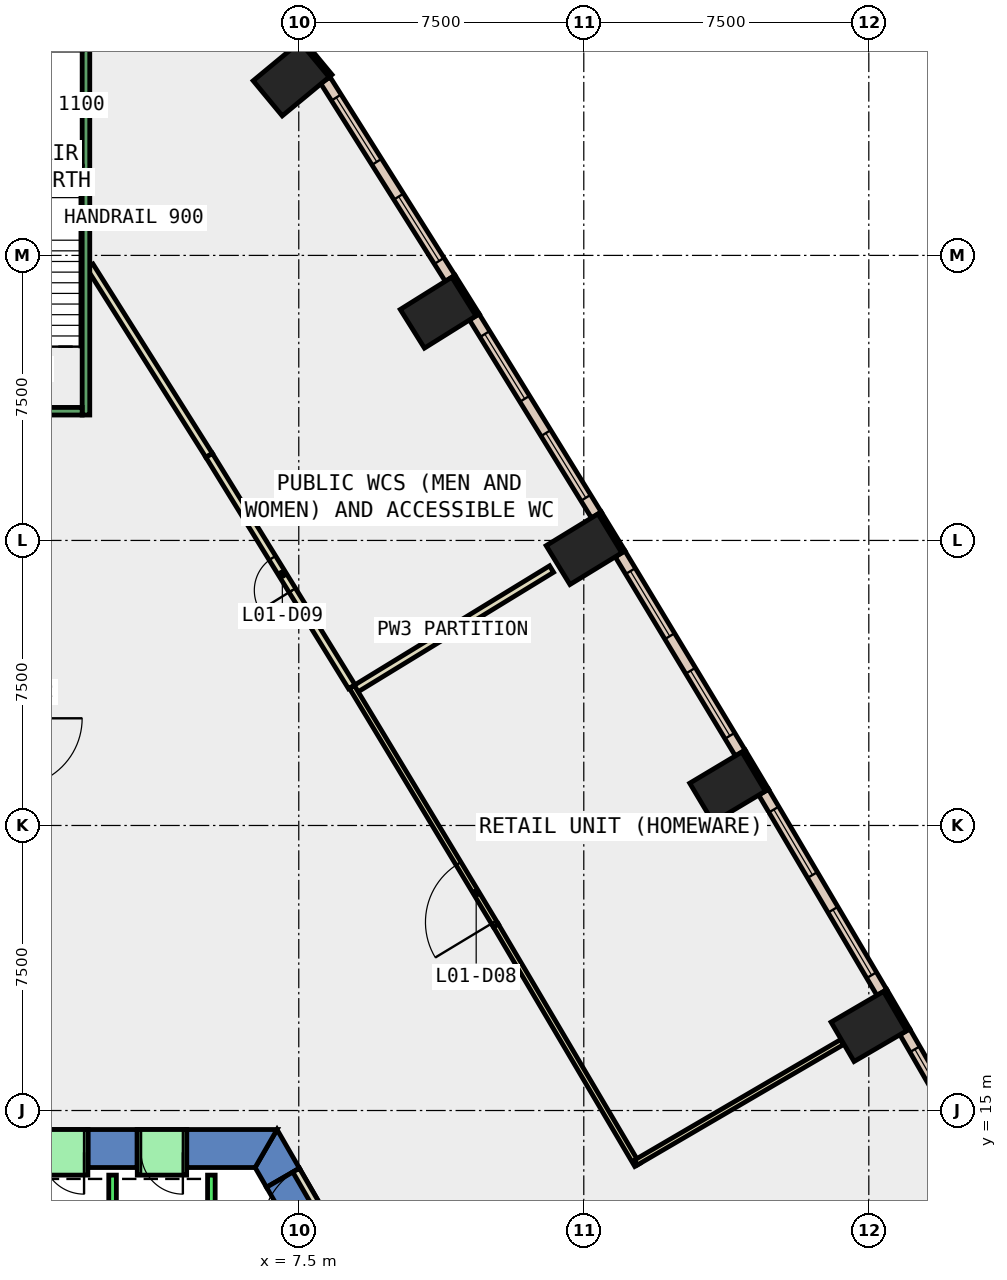
"""IFC4 building model, lengths in metres.
Left out: names, types, materials, properties, quantities, classifications, styles, units other than length and angle.
Written with IfcOpenShell. Run it as: python <this file> out.ifc"""

import sys

from ifc_helpers import new_model, si_unit, direction, frame, frame_2d, origin, origin_2d, place, context, subcontext, project, spatial, polyline, rectangle, outline, extrude, element, fill, save


model = new_model("IFC4")
c1 = context("Model", 3, precision=1e-05, world=origin(), true_north=direction((0.0, 1.0)))
c2 = subcontext(c1, "Body", "Model", "MODEL_VIEW")
j1 = project(units=[si_unit("LENGTHUNIT", "METRE"), si_unit("PLANEANGLEUNIT", "RADIAN")], contexts=[c1])
p1 = place(None, origin())
s1 = spatial("IfcSite", under=j1, at=p1, CompositionType="ELEMENT")
p2 = place(p1, origin())
s2 = spatial("IfcBuilding", under=s1, at=p2, CompositionType="ELEMENT")
p3 = place(p2, frame((0.0, 0.0, 9.0)))
s3 = spatial("IfcBuildingStorey", under=s2, at=p3, CompositionType="ELEMENT", Elevation=9.0)
for number, where, z_axis, x_axis in (
    (1, (22.5, 17.211, -0.45), (0.0, 0.0, 1.0), (-0.504, 0.864, 0.0)),
    (2, (18.782, 23.508, -0.45), (0.0, 0.0, 1.0), (-0.513, 0.858, 0.0)),
    (3, (15.005, 29.769, -0.45), (0.0, 0.0, 1.0), (-0.522, 0.853, 0.0)),
    (4, (11.167, 35.993, -0.45), (0.0, 0.0, 1.0), (-0.53, 0.848, 0.0)),
    (5, (7.299, 42.144, -0.45), (0.0, 0.0, 1.0), (-0.638, 0.77, 0.0)),
):
    element("IfcColumn", number, at=place(p3, frame(where, z_axis=z_axis, x_axis=x_axis)), inside=s3, PredefinedType="COLUMN", context=c2, shape_type="SweptSolid", body=[
        extrude(rectangle(XDim=1.2, YDim=1.6, at=origin_2d()), origin(), (0.0, 0.0, 1.0), 6.0),
    ])
p4 = place(p3, frame((0.0, 0.0, -0.45)))
e6 = element("IfcWall", 6, at=p4, inside=s3, PredefinedType="SHEAR", context=c2, shape_type="SweptSolid", body=[
    extrude(outline(polyline([(6.651, 12.98), (7.517, 13.48), (6.928, 14.5), (6.351, 13.5), (6.651, 12.98)])), origin(), (0.0, 0.0, 1.0), 6.0),
])
p5 = place(p3, frame((0.0, 0.0, 3.6)))
e7 = element("IfcWall", 7, at=p5, inside=s3, PredefinedType="SHEAR", context=c2, shape_type="SweptSolid", body=[
    extrude(outline(polyline([(7.517, 13.48), (6.651, 12.98), (7.651, 11.248), (8.517, 11.748), (7.517, 13.48)])), origin(), (0.0, 0.0, 1.0), 1.95),
])
p6 = place(p3, frame((0.0, 0.0, -0.45)))
e8 = element("IfcWall", 8, at=p6, inside=s3, PredefinedType="SHEAR", context=c2, shape_type="SweptSolid", body=[
    extrude(outline(polyline([(4.55, 14.5), (4.55, 13.5), (6.351, 13.5), (6.928, 14.5), (4.55, 14.5)])), origin(), (0.0, 0.0, 1.0), 6.0),
])
p7 = place(p3, frame((0.0, 0.0, -0.45)))
e9 = element("IfcWall", 9, at=p7, inside=s3, PredefinedType="SHEAR", context=c2, shape_type="SweptSolid", body=[
    extrude(outline(polyline([(1.95, 14.5), (1.95, 13.5), (3.25, 13.5), (3.25, 14.5), (1.95, 14.5)])), origin(), (0.0, 0.0, 1.0), 6.0),
])
p8 = place(p3, frame((0.0, 0.0, 3.6)))
e10 = element("IfcWall", 10, at=p8, inside=s3, PredefinedType="SHEAR", context=c2, shape_type="SweptSolid", body=[
    extrude(outline(polyline([(3.25, 14.5), (3.25, 13.5), (4.55, 13.5), (4.55, 14.5), (3.25, 14.5)])), origin(), (0.0, 0.0, 1.0), 1.95),
])
p9 = place(p3, frame((0.0, 0.0, 3.6)))
e11 = element("IfcWall", 11, at=p9, inside=s3, PredefinedType="SHEAR", context=c2, shape_type="SweptSolid", body=[
    extrude(outline(polyline([(0.65, 14.5), (0.65, 13.5), (1.95, 13.5), (1.95, 14.5), (0.65, 14.5)])), origin(), (0.0, 0.0, 1.0), 1.95),
])
p10 = place(p3, frame((23.536, 17.122, 0.0), z_axis=(0.0, 0.0, 1.0), x_axis=(-0.504313844903, 0.863520437418, 0.0)))
e12 = element("IfcWall", 12, at=p10, inside=s3, PredefinedType="STANDARD", context=c2, shape_type="SweptSolid", body=[
    extrude(rectangle(XDim=1.2, YDim=0.1, at=frame_2d((0.6, 0.0))), origin(), (0.0, 0.0, 1.0), 5.55),
])
p11 = place(p3, frame((19.82, 23.429, 0.0), z_axis=(0.0, 0.0, 1.0), x_axis=(-0.513238760752, 0.858245870635, 0.0)))
e13 = element("IfcWall", 13, at=p11, inside=s3, PredefinedType="STANDARD", context=c2, shape_type="SweptSolid", body=[
    extrude(rectangle(XDim=1.2, YDim=0.1, at=frame_2d((0.6, 0.0))), origin(), (0.0, 0.0, 1.0), 5.55),
])
p12 = place(p3, frame((16.043, 29.7, 0.0), z_axis=(0.0, 0.0, 1.0), x_axis=(-0.521507599072, 0.853246637327, 0.0)))
e14 = element("IfcWall", 14, at=p12, inside=s3, PredefinedType="STANDARD", context=c2, shape_type="SweptSolid", body=[
    extrude(rectangle(XDim=1.2, YDim=0.1, at=frame_2d((0.6, 0.0))), origin(), (0.0, 0.0, 1.0), 5.55),
])
for number, where, z_axis, x_axis in (
    (15, (12.206, 35.935, 0.0), (0.0, 0.0, 1.0), (-0.53, 0.848, 0.0)),
    (16, (8.336, 42.224, 0.0), (0.0, 0.0, 1.0), (-0.638, 0.77, 0.0)),
):
    element("IfcWall", number, at=place(p3, frame(where, z_axis=z_axis, x_axis=x_axis)), inside=s3, PredefinedType="STANDARD", context=c2, shape_type="SweptSolid", body=[
        extrude(rectangle(XDim=1.199, YDim=0.1, at=frame_2d((0.6, 0.0))), origin(), (0.0, 0.0, 1.0), 5.55),
    ])
p13 = place(p3, frame((26.507, 11.77, 0.0), z_axis=(0.0, 0.0, 1.0), x_axis=(-0.499939977436, 0.866060055055, 0.0)))
e17 = element("IfcWall", 17, at=p13, inside=s3, PredefinedType="STANDARD", context=c2, shape_type="SweptSolid", body=[
    extrude(rectangle(XDim=6.121, YDim=0.3, at=frame_2d((3.061, 0.0))), origin(), (0.0, 0.0, 1.0), 5.55),
])
p14 = place(p13, frame((0.53, 0.0, 1.0)))
e18 = element("IfcOpeningElement", 18, at=p14, cuts=e17, PredefinedType="OPENING", context=c2, shape_type="SweptSolid", body=[
    extrude(rectangle(XDim=2.0, YDim=4.0, at=frame_2d((1.0, 2.0))), frame((0.0, 0.16, 0.0), z_axis=(0.0, -1.0, 0.0), x_axis=(1.0, 0.0, 0.0)), (0.0, 0.0, 1.0), 0.32),
])
p15 = place(p13, frame((3.591, 0.0, 1.0)))
e19 = element("IfcOpeningElement", 19, at=p15, cuts=e17, PredefinedType="OPENING", context=c2, shape_type="SweptSolid", body=[
    extrude(rectangle(XDim=2.0, YDim=4.0, at=frame_2d((1.0, 2.0))), frame((0.0, 0.16, 0.0), z_axis=(0.0, -1.0, 0.0), x_axis=(1.0, 0.0, 0.0)), (0.0, 0.0, 1.0), 0.32),
])
p16 = place(p3, frame((22.843, 18.105, 0.0), z_axis=(0.0, 0.0, 1.0), x_axis=(-0.50834231483, 0.861155091115, 0.0)))
e20 = element("IfcWall", 20, at=p16, inside=s3, PredefinedType="STANDARD", context=c2, shape_type="SweptSolid", body=[
    extrude(rectangle(XDim=6.122, YDim=0.3, at=frame_2d((3.061, 0.0))), origin(), (0.0, 0.0, 1.0), 5.55),
])
p17 = place(p16, frame((0.53, 0.0, 1.0)))
e21 = element("IfcOpeningElement", 21, at=p17, cuts=e20, PredefinedType="OPENING", context=c2, shape_type="SweptSolid", body=[
    extrude(rectangle(XDim=2.0, YDim=4.0, at=frame_2d((1.0, 2.0))), frame((0.0, 0.16, 0.0), z_axis=(0.0, -1.0, 0.0), x_axis=(1.0, 0.0, 0.0)), (0.0, 0.0, 1.0), 0.32),
])
p18 = place(p16, frame((3.591, 0.0, 1.0)))
e22 = element("IfcOpeningElement", 22, at=p18, cuts=e20, PredefinedType="OPENING", context=c2, shape_type="SweptSolid", body=[
    extrude(rectangle(XDim=2.0, YDim=4.0, at=frame_2d((1.0, 2.0))), frame((0.0, 0.16, 0.0), z_axis=(0.0, -1.0, 0.0), x_axis=(1.0, 0.0, 0.0)), (0.0, 0.0, 1.0), 0.32),
])
p19 = place(p3, frame((19.117, 24.406, 0.0), z_axis=(0.0, 0.0, 1.0), x_axis=(-0.516687651362, 0.85617397235, 0.0)))
e23 = element("IfcWall", 23, at=p19, inside=s3, PredefinedType="STANDARD", context=c2, shape_type="SweptSolid", body=[
    extrude(rectangle(XDim=6.121, YDim=0.3, at=frame_2d((3.061, 0.0))), origin(), (0.0, 0.0, 1.0), 5.55),
])
p20 = place(p19, frame((0.53, 0.0, 1.0)))
e24 = element("IfcOpeningElement", 24, at=p20, cuts=e23, PredefinedType="OPENING", context=c2, shape_type="SweptSolid", body=[
    extrude(rectangle(XDim=2.0, YDim=4.0, at=frame_2d((1.0, 2.0))), frame((0.0, 0.16, 0.0), z_axis=(0.0, -1.0, 0.0), x_axis=(1.0, 0.0, 0.0)), (0.0, 0.0, 1.0), 0.32),
])
p21 = place(p19, frame((3.591, 0.0, 1.0)))
e25 = element("IfcOpeningElement", 25, at=p21, cuts=e23, PredefinedType="OPENING", context=c2, shape_type="SweptSolid", body=[
    extrude(rectangle(XDim=2.0, YDim=4.0, at=frame_2d((1.0, 2.0))), frame((0.0, 0.16, 0.0), z_axis=(0.0, -1.0, 0.0), x_axis=(1.0, 0.0, 0.0)), (0.0, 0.0, 1.0), 0.32),
])
p22 = place(p3, frame((15.331, 30.67, 0.0), z_axis=(0.0, 0.0, 1.0), x_axis=(-0.524953701886, 0.85113078365, 0.0)))
e26 = element("IfcWall", 26, at=p22, inside=s3, PredefinedType="STANDARD", context=c2, shape_type="SweptSolid", body=[
    extrude(rectangle(XDim=6.123, YDim=0.3, at=frame_2d((3.061, 0.0))), origin(), (0.0, 0.0, 1.0), 5.55),
])
p23 = place(p22, frame((0.531, 0.0, 1.0)))
e27 = element("IfcOpeningElement", 27, at=p23, cuts=e26, PredefinedType="OPENING", context=c2, shape_type="SweptSolid", body=[
    extrude(rectangle(XDim=2.0, YDim=4.0, at=frame_2d((1.0, 2.0))), frame((0.0, 0.16, 0.0), z_axis=(0.0, -1.0, 0.0), x_axis=(1.0, 0.0, 0.0)), (0.0, 0.0, 1.0), 0.32),
])
p24 = place(p22, frame((3.592, 0.0, 1.0)))
e28 = element("IfcOpeningElement", 28, at=p24, cuts=e26, PredefinedType="OPENING", context=c2, shape_type="SweptSolid", body=[
    extrude(rectangle(XDim=2.0, YDim=4.0, at=frame_2d((1.0, 2.0))), frame((0.0, 0.16, 0.0), z_axis=(0.0, -1.0, 0.0), x_axis=(1.0, 0.0, 0.0)), (0.0, 0.0, 1.0), 0.32),
])
p25 = place(p3, frame((11.483, 36.897, 0.0), z_axis=(0.0, 0.0, 1.0), x_axis=(-0.53304020879, 0.846089910006, 0.0)))
e29 = element("IfcWall", 29, at=p25, inside=s3, PredefinedType="STANDARD", context=c2, shape_type="SweptSolid", body=[
    extrude(rectangle(XDim=6.163, YDim=0.3, at=frame_2d((3.081, 0.0))), origin(), (0.0, 0.0, 1.0), 5.55),
])
p26 = place(p25, frame((0.541, 0.0, 1.0)))
e30 = element("IfcOpeningElement", 30, at=p26, cuts=e29, PredefinedType="OPENING", context=c2, shape_type="SweptSolid", body=[
    extrude(rectangle(XDim=2.0, YDim=4.0, at=frame_2d((1.0, 2.0))), frame((0.0, 0.16, 0.0), z_axis=(0.0, -1.0, 0.0), x_axis=(1.0, 0.0, 0.0)), (0.0, 0.0, 1.0), 0.32),
])
p27 = place(p25, frame((3.622, 0.0, 1.0)))
e31 = element("IfcOpeningElement", 31, at=p27, cuts=e29, PredefinedType="OPENING", context=c2, shape_type="SweptSolid", body=[
    extrude(rectangle(XDim=2.0, YDim=4.0, at=frame_2d((1.0, 2.0))), frame((0.0, 0.16, 0.0), z_axis=(0.0, -1.0, 0.0), x_axis=(1.0, 0.0, 0.0)), (0.0, 0.0, 1.0), 0.32),
])
p28 = place(p3, frame((8.947, 26.065, 0.0), z_axis=(0.0, 0.0, 1.0), x_axis=(0.853190812677, 0.52159892366, 0.0)))
e32 = element("IfcWall", 32, at=p28, inside=s3, PredefinedType="PARTITIONING", context=c2, shape_type="SweptSolid", body=[
    extrude(rectangle(XDim=6.101, YDim=0.2, at=frame_2d((3.05, 0.0))), origin(), (0.0, 0.0, 1.0), 5.55),
])
p29 = place(p3, frame((16.406, 13.566, 0.0), z_axis=(0.0, 0.0, 1.0), x_axis=(-0.508297783334, 0.861181376632, 0.0)))
e33 = element("IfcWall", 33, at=p29, inside=s3, PredefinedType="PARTITIONING", context=c2, shape_type="SweptSolid", body=[
    extrude(rectangle(XDim=7.32, YDim=0.15, at=frame_2d((3.66, 0.0))), origin(), (0.0, 0.0, 1.0), 5.55),
])
p30 = place(p3, frame((12.685, 19.87, 0.0), z_axis=(0.0, 0.0, 1.0), x_axis=(-0.516657396372, 0.856192230036, 0.0)))
e34 = element("IfcWall", 34, at=p30, inside=s3, PredefinedType="PARTITIONING", context=c2, shape_type="SweptSolid", body=[
    extrude(rectangle(XDim=7.336, YDim=0.15, at=frame_2d((3.668, 0.0))), origin(), (0.0, 0.0, 1.0), 5.55),
])
p31 = place(p30, frame((0.1, 0.0, 0.0)))
e35 = element("IfcOpeningElement", 35, at=p31, cuts=e34, PredefinedType="OPENING", context=c2, shape_type="SweptSolid", body=[
    extrude(rectangle(XDim=1.8, YDim=2.1, at=frame_2d((0.9, 1.05))), frame((0.0, 0.085, 0.0), z_axis=(0.0, -1.0, 0.0), x_axis=(1.0, 0.0, 0.0)), (0.0, 0.0, 1.0), 0.17),
])
p32 = place(p3, frame((21.792, 16.798, 0.0), z_axis=(0.0, 0.0, 1.0), x_axis=(-0.863450223864, -0.504434050109, 0.0)))
e36 = element("IfcWall", 36, at=p32, inside=s3, PredefinedType="PARTITIONING", context=c2, shape_type="SweptSolid", body=[
    extrude(rectangle(XDim=6.281, YDim=0.15, at=frame_2d((3.14, 0.0))), origin(), (0.0, 0.0, 1.0), 5.55),
])
p33 = place(p3, frame((5.141, 32.238, 0.0), z_axis=(0.0, 0.0, 1.0), x_axis=(-0.533266105174, 0.8459475522, 0.0)))
e37 = element("IfcWall", 37, at=p33, inside=s3, PredefinedType="PARTITIONING", context=c2, shape_type="SweptSolid", body=[
    extrude(rectangle(XDim=5.89, YDim=0.2, at=frame_2d((2.945, 0.0))), origin(), (0.0, 0.0, 1.0), 5.55),
])
p34 = place(p3, frame((8.894, 26.151, 0.0), z_axis=(0.0, 0.0, 1.0), x_axis=(-0.524805840192, 0.851221962887, 0.0)))
e38 = element("IfcWall", 38, at=p34, inside=s3, PredefinedType="PARTITIONING", context=c2, shape_type="SweptSolid", body=[
    extrude(rectangle(XDim=7.151, YDim=0.2, at=frame_2d((3.576, 0.0))), origin(), (0.0, 0.0, 1.0), 5.55),
])
p35 = place(p34, frame((2.98, 0.0, 0.0)))
e39 = element("IfcOpeningElement", 39, at=p35, cuts=e38, PredefinedType="OPENING", context=c2, shape_type="SweptSolid", body=[
    extrude(rectangle(XDim=1.0, YDim=2.1, at=frame_2d((0.5, 1.05))), frame((0.0, 0.11, 0.0), z_axis=(0.0, -1.0, 0.0), x_axis=(1.0, 0.0, 0.0)), (0.0, 0.0, 1.0), 0.22),
])
p36 = place(p3, frame((8.43, 11.698, 0.0), z_axis=(0.0, 0.0, 1.0), x_axis=(-0.50002537861, 0.866010750942, 0.0)))
e40 = element("IfcWall", 40, at=p36, inside=s3, PredefinedType="PARTITIONING", context=c2, shape_type="SweptSolid", body=[
    extrude(rectangle(XDim=2.0, YDim=0.2, at=frame_2d((1.0, 0.0))), origin(), (0.0, 0.0, 1.0), 2.4),
])
p37 = place(p36, frame((0.19, 0.0, 0.0)))
e41 = element("IfcOpeningElement", 41, at=p37, cuts=e40, PredefinedType="OPENING", context=c2, shape_type="SweptSolid", body=[
    extrude(rectangle(XDim=1.8, YDim=2.1, at=frame_2d((0.9, 1.05))), frame((0.0, 0.11, 0.0), z_axis=(0.0, -1.0, 0.0), x_axis=(1.0, 0.0, 0.0)), (0.0, 0.0, 1.0), 0.22),
])
for number, where, z_axis, x_axis in (
    (42, (5.2, 10.8, 0.0), (0.0, 0.0, 1.0), (0.0, 1.0, 0.0)),
    (43, (2.6, 10.8, 0.0), (0.0, 0.0, 1.0), (0.0, 1.0, 0.0)),
):
    element("IfcWall", number, at=place(p3, frame(where, z_axis=z_axis, x_axis=x_axis)), inside=s3, PredefinedType="STANDARD", context=c2, shape_type="SweptSolid", body=[
        extrude(rectangle(XDim=2.5, YDim=0.2, at=frame_2d((1.25, 0.0))), origin(), (0.0, 0.0, 1.0), 5.55),
    ])
p38 = place(p3, frame((4.55, 13.9, 0.0), z_axis=(0.0, 0.0, 1.0), x_axis=(-1.0, 0.0, 0.0)))
e44 = element("IfcWall", 44, at=p38, inside=s3, PredefinedType="STANDARD", context=c2, shape_type="SweptSolid", body=[
    extrude(rectangle(XDim=1.3, YDim=1.2, at=frame_2d((0.65, 0.0))), origin(), (0.0, 0.0, 1.0), 2.4),
])
p39 = place(p38, frame((0.1, 0.0, 0.0)))
e45 = element("IfcOpeningElement", 45, at=p39, cuts=e44, PredefinedType="OPENING", context=c2, shape_type="SweptSolid", body=[
    extrude(rectangle(XDim=1.1, YDim=2.3, at=frame_2d((0.55, 1.15))), frame((0.0, 0.61, 0.0), z_axis=(0.0, -1.0, 0.0), x_axis=(1.0, 0.0, 0.0)), (0.0, 0.0, 1.0), 1.22),
])
p40 = place(p3, frame((1.95, 13.9, 0.0), z_axis=(0.0, 0.0, 1.0), x_axis=(-1.0, 0.0, 0.0)))
e46 = element("IfcWall", 46, at=p40, inside=s3, PredefinedType="STANDARD", context=c2, shape_type="SweptSolid", body=[
    extrude(rectangle(XDim=1.3, YDim=1.2, at=frame_2d((0.65, 0.0))), origin(), (0.0, 0.0, 1.0), 2.4),
])
p41 = place(p40, frame((0.1, 0.0, 0.0)))
e47 = element("IfcOpeningElement", 47, at=p41, cuts=e46, PredefinedType="OPENING", context=c2, shape_type="SweptSolid", body=[
    extrude(rectangle(XDim=1.1, YDim=2.3, at=frame_2d((0.55, 1.15))), frame((0.0, 0.61, 0.0), z_axis=(0.0, -1.0, 0.0), x_axis=(1.0, 0.0, 0.0)), (0.0, 0.0, 1.0), 1.22),
])
p42 = place(p3, frame((1.9, 33.3, 0.0), z_axis=(0.0, 0.0, 1.0), x_axis=(0.0, 1.0, 0.0)))
e48 = element("IfcWall", 48, at=p42, inside=s3, PredefinedType="STANDARD", context=c2, shape_type="SweptSolid", body=[
    extrude(rectangle(XDim=9.8, YDim=0.2, at=frame_2d((4.9, 0.0))), origin(), (0.0, 0.0, 1.0), 5.55),
])
p43 = place(p3, frame((1.8, 33.4, 0.0), z_axis=(0.0, 0.0, 1.0), x_axis=(-1.0, 0.0, 0.0)))
e49 = element("IfcWall", 49, at=p43, inside=s3, PredefinedType="STANDARD", context=c2, shape_type="SweptSolid", body=[
    extrude(rectangle(XDim=3.6, YDim=0.2, at=frame_2d((1.8, 0.0))), origin(), (0.0, 0.0, 1.0), 5.55),
])
p44 = place(p43, frame((2.05, 0.0, 0.0)))
e50 = element("IfcOpeningElement", 50, at=p44, cuts=e49, PredefinedType="OPENING", context=c2, shape_type="SweptSolid", body=[
    extrude(rectangle(XDim=1.2, YDim=2.2, at=frame_2d((0.6, 1.1))), frame((0.0, 0.11, 0.0), z_axis=(0.0, -1.0, 0.0), x_axis=(1.0, 0.0, 0.0)), (0.0, 0.0, 1.0), 0.22),
])
p45 = place(p15, origin())
e51 = element("IfcWindow", 51, at=p45, inside=s3, PartitioningType="SINGLE_PANEL", PredefinedType="WINDOW", context=c2, shape_type="SweptSolid", body=[
    extrude(rectangle(XDim=2.0, YDim=4.0, at=frame_2d((1.0, 2.0))), frame((0.0, 0.03, 0.0), z_axis=(0.0, -1.0, 0.0), x_axis=(1.0, 0.0, 0.0)), (0.0, 0.0, 1.0), 0.06),
])
fill(e19, e51)
p46 = place(p17, origin())
e52 = element("IfcWindow", 52, at=p46, inside=s3, PartitioningType="SINGLE_PANEL", PredefinedType="WINDOW", context=c2, shape_type="SweptSolid", body=[
    extrude(rectangle(XDim=2.0, YDim=4.0, at=frame_2d((1.0, 2.0))), frame((0.0, 0.03, 0.0), z_axis=(0.0, -1.0, 0.0), x_axis=(1.0, 0.0, 0.0)), (0.0, 0.0, 1.0), 0.06),
])
fill(e21, e52)
p47 = place(p18, origin())
e53 = element("IfcWindow", 53, at=p47, inside=s3, PartitioningType="SINGLE_PANEL", PredefinedType="WINDOW", context=c2, shape_type="SweptSolid", body=[
    extrude(rectangle(XDim=2.0, YDim=4.0, at=frame_2d((1.0, 2.0))), frame((0.0, 0.03, 0.0), z_axis=(0.0, -1.0, 0.0), x_axis=(1.0, 0.0, 0.0)), (0.0, 0.0, 1.0), 0.06),
])
fill(e22, e53)
p48 = place(p20, origin())
e54 = element("IfcWindow", 54, at=p48, inside=s3, PartitioningType="SINGLE_PANEL", PredefinedType="WINDOW", context=c2, shape_type="SweptSolid", body=[
    extrude(rectangle(XDim=2.0, YDim=4.0, at=frame_2d((1.0, 2.0))), frame((0.0, 0.03, 0.0), z_axis=(0.0, -1.0, 0.0), x_axis=(1.0, 0.0, 0.0)), (0.0, 0.0, 1.0), 0.06),
])
fill(e24, e54)
p49 = place(p21, origin())
e55 = element("IfcWindow", 55, at=p49, inside=s3, PartitioningType="SINGLE_PANEL", PredefinedType="WINDOW", context=c2, shape_type="SweptSolid", body=[
    extrude(rectangle(XDim=2.0, YDim=4.0, at=frame_2d((1.0, 2.0))), frame((0.0, 0.03, 0.0), z_axis=(0.0, -1.0, 0.0), x_axis=(1.0, 0.0, 0.0)), (0.0, 0.0, 1.0), 0.06),
])
fill(e25, e55)
p50 = place(p23, origin())
e56 = element("IfcWindow", 56, at=p50, inside=s3, PartitioningType="SINGLE_PANEL", PredefinedType="WINDOW", context=c2, shape_type="SweptSolid", body=[
    extrude(rectangle(XDim=2.0, YDim=4.0, at=frame_2d((1.0, 2.0))), frame((0.0, 0.03, 0.0), z_axis=(0.0, -1.0, 0.0), x_axis=(1.0, 0.0, 0.0)), (0.0, 0.0, 1.0), 0.06),
])
fill(e27, e56)
p51 = place(p24, origin())
e57 = element("IfcWindow", 57, at=p51, inside=s3, PartitioningType="SINGLE_PANEL", PredefinedType="WINDOW", context=c2, shape_type="SweptSolid", body=[
    extrude(rectangle(XDim=2.0, YDim=4.0, at=frame_2d((1.0, 2.0))), frame((0.0, 0.03, 0.0), z_axis=(0.0, -1.0, 0.0), x_axis=(1.0, 0.0, 0.0)), (0.0, 0.0, 1.0), 0.06),
])
fill(e28, e57)
p52 = place(p26, origin())
e58 = element("IfcWindow", 58, at=p52, inside=s3, PartitioningType="SINGLE_PANEL", PredefinedType="WINDOW", context=c2, shape_type="SweptSolid", body=[
    extrude(rectangle(XDim=2.0, YDim=4.0, at=frame_2d((1.0, 2.0))), frame((0.0, 0.03, 0.0), z_axis=(0.0, -1.0, 0.0), x_axis=(1.0, 0.0, 0.0)), (0.0, 0.0, 1.0), 0.06),
])
fill(e30, e58)
p53 = place(p27, origin())
e59 = element("IfcWindow", 59, at=p53, inside=s3, PartitioningType="SINGLE_PANEL", PredefinedType="WINDOW", context=c2, shape_type="SweptSolid", body=[
    extrude(rectangle(XDim=2.0, YDim=4.0, at=frame_2d((1.0, 2.0))), frame((0.0, 0.03, 0.0), z_axis=(0.0, -1.0, 0.0), x_axis=(1.0, 0.0, 0.0)), (0.0, 0.0, 1.0), 0.06),
])
fill(e31, e59)
p54 = place(p31, origin())
e60 = element("IfcDoor", 60, at=p54, inside=s3, OperationType="DOUBLE_DOOR_SINGLE_SWING", PredefinedType="DOOR", context=c2, shape_type="SweptSolid", body=[
    extrude(rectangle(XDim=1.8, YDim=2.1, at=frame_2d((0.9, 1.05))), frame((0.0, 0.025, 0.0), z_axis=(0.0, -1.0, 0.0), x_axis=(1.0, 0.0, 0.0)), (0.0, 0.0, 1.0), 0.05),
])
fill(e35, e60)
p55 = place(p35, origin())
e61 = element("IfcDoor", 61, at=p55, inside=s3, OperationType="SINGLE_SWING_RIGHT", PredefinedType="DOOR", context=c2, shape_type="SweptSolid", body=[
    extrude(rectangle(XDim=1.0, YDim=2.1, at=frame_2d((0.5, 1.05))), frame((0.0, 0.025, 0.0), z_axis=(0.0, -1.0, 0.0), x_axis=(1.0, 0.0, 0.0)), (0.0, 0.0, 1.0), 0.05),
])
fill(e39, e61)
p56 = place(p37, origin())
e62 = element("IfcDoor", 62, at=p56, inside=s3, OperationType="DOUBLE_DOOR_SINGLE_SWING", PredefinedType="DOOR", context=c2, shape_type="SweptSolid", body=[
    extrude(rectangle(XDim=1.8, YDim=2.1, at=frame_2d((0.9, 1.05))), frame((0.0, 0.025, 0.0), z_axis=(0.0, -1.0, 0.0), x_axis=(1.0, 0.0, 0.0)), (0.0, 0.0, 1.0), 0.05),
])
fill(e41, e62)
p57 = place(p39, origin())
e63 = element("IfcDoor", 63, at=p57, inside=s3, OperationType="SLIDING_TO_LEFT", PredefinedType="DOOR", context=c2, shape_type="SweptSolid", body=[
    extrude(rectangle(XDim=1.1, YDim=2.3, at=frame_2d((0.55, 1.15))), frame((0.0, 0.025, 0.0), z_axis=(0.0, -1.0, 0.0), x_axis=(1.0, 0.0, 0.0)), (0.0, 0.0, 1.0), 0.05),
])
fill(e45, e63)
p58 = place(p41, origin())
e64 = element("IfcDoor", 64, at=p58, inside=s3, OperationType="SLIDING_TO_LEFT", PredefinedType="DOOR", context=c2, shape_type="SweptSolid", body=[
    extrude(rectangle(XDim=1.1, YDim=2.3, at=frame_2d((0.55, 1.15))), frame((0.0, 0.025, 0.0), z_axis=(0.0, -1.0, 0.0), x_axis=(1.0, 0.0, 0.0)), (0.0, 0.0, 1.0), 0.05),
])
fill(e47, e64)
save(model, sys.argv[1])
